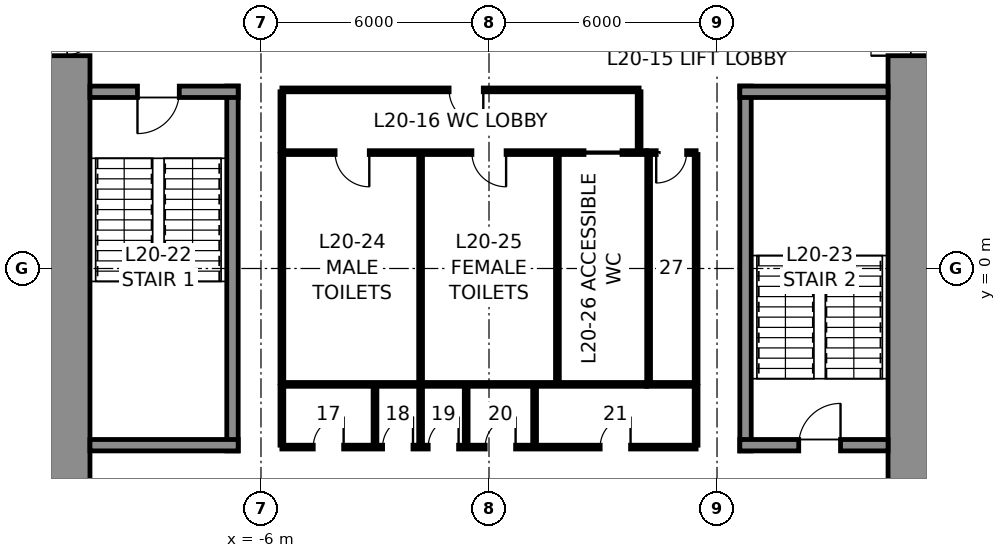
"""IFC4 building model, lengths in metres.
Left out: names, types, materials, properties, quantities, classifications, styles, units other than length and angle.
Written with IfcOpenShell. Run it as: python <this file> out.ifc"""

import sys

from ifc_helpers import new_model, si_unit, direction, frame, frame_2d, origin, place, context, subcontext, project, spatial, rectangle, extrude, element, fill, save


model = new_model("IFC4")
c1 = context("Model", 3, precision=1e-05, world=origin(), true_north=direction((0.0, 1.0)))
c2 = subcontext(c1, "Body", "Model", "MODEL_VIEW")
j1 = project(units=[si_unit("LENGTHUNIT", "METRE"), si_unit("PLANEANGLEUNIT", "RADIAN")], contexts=[c1])
p1 = place(None, origin())
s1 = spatial("IfcSite", under=j1, at=p1, CompositionType="ELEMENT")
p2 = place(p1, origin())
s2 = spatial("IfcBuilding", under=s1, at=p2, CompositionType="ELEMENT")
p3 = place(p2, frame((0.0, 0.0, 104.4)))
s3 = spatial("IfcBuildingStorey", under=s2, at=p3, CompositionType="ELEMENT", Elevation=104.4)
p4 = place(p3, frame((11.25, 10.5, 0.0), z_axis=(0.0, 0.0, 1.0), x_axis=(0.0, -1.0, 0.0)))
e1 = element("IfcWall", 1, at=p4, inside=s3, PredefinedType="SHEAR", context=c2, shape_type="SweptSolid", body=[
    extrude(rectangle(XDim=21.0, YDim=1.5, at=frame_2d((10.5, 0.0))), origin(), (0.0, 0.0, 1.0), 4.6),
])
p5 = place(p4, frame((3.7, 0.0, 0.0)))
e2 = element("IfcOpeningElement", 2, at=p5, cuts=e1, PredefinedType="OPENING", context=c2, shape_type="SweptSolid", body=[
    extrude(rectangle(XDim=1.2, YDim=2.3, at=frame_2d((0.6, 1.15))), frame((0.0, 0.76, 0.0), z_axis=(0.0, -1.0, 0.0), x_axis=(1.0, 0.0, 0.0)), (0.0, 0.0, 1.0), 1.52),
])
p6 = place(p4, frame((16.1, 0.0, 0.0)))
e3 = element("IfcOpeningElement", 3, at=p6, cuts=e1, PredefinedType="OPENING", context=c2, shape_type="SweptSolid", body=[
    extrude(rectangle(XDim=1.2, YDim=2.3, at=frame_2d((0.6, 1.15))), frame((0.0, 0.76, 0.0), z_axis=(0.0, -1.0, 0.0), x_axis=(1.0, 0.0, 0.0)), (0.0, 0.0, 1.0), 1.52),
])
p7 = place(p3, frame((-11.25, -10.5, 0.0), z_axis=(0.0, 0.0, 1.0), x_axis=(0.0, 1.0, 0.0)))
e4 = element("IfcWall", 4, at=p7, inside=s3, PredefinedType="SHEAR", context=c2, shape_type="SweptSolid", body=[
    extrude(rectangle(XDim=21.0, YDim=1.5, at=frame_2d((10.5, 0.0))), origin(), (0.0, 0.0, 1.0), 4.6),
])
p8 = place(p7, frame((16.1, 0.0, 0.0)))
e5 = element("IfcOpeningElement", 5, at=p8, cuts=e4, PredefinedType="OPENING", context=c2, shape_type="SweptSolid", body=[
    extrude(rectangle(XDim=1.2, YDim=2.3, at=frame_2d((0.6, 1.15))), frame((0.0, 0.76, 0.0), z_axis=(0.0, -1.0, 0.0), x_axis=(1.0, 0.0, 0.0)), (0.0, 0.0, 1.0), 1.52),
])
p9 = place(p7, frame((3.7, 0.0, 0.0)))
e6 = element("IfcOpeningElement", 6, at=p9, cuts=e4, PredefinedType="OPENING", context=c2, shape_type="SweptSolid", body=[
    extrude(rectangle(XDim=1.2, YDim=2.3, at=frame_2d((0.6, 1.15))), frame((0.0, 0.76, 0.0), z_axis=(0.0, -1.0, 0.0), x_axis=(1.0, 0.0, 0.0)), (0.0, 0.0, 1.0), 1.52),
])
p10 = place(p3, frame((-6.75, -4.8, 0.0), z_axis=(0.0, 0.0, 1.0), x_axis=(0.0, 1.0, 0.0)))
e7 = element("IfcWall", 7, at=p10, inside=s3, PredefinedType="SOLIDWALL", context=c2, shape_type="SweptSolid", body=[
    extrude(rectangle(XDim=9.6, YDim=0.3, at=frame_2d((4.8, 0.0))), origin(), (0.0, 0.0, 1.0), 4.35),
])
p11 = place(p3, frame((-10.5, 4.65, 0.0), z_axis=(0.0, 0.0, 1.0), x_axis=(1.0, 0.0, 0.0)))
e8 = element("IfcWall", 8, at=p11, inside=s3, PredefinedType="SOLIDWALL", context=c2, shape_type="SweptSolid", body=[
    extrude(rectangle(XDim=3.9, YDim=0.3, at=frame_2d((1.95, 0.0))), origin(), (0.0, 0.0, 1.0), 4.35),
])
p12 = place(p11, frame((1.25, 0.0, 0.0)))
e9 = element("IfcOpeningElement", 9, at=p12, cuts=e8, PredefinedType="OPENING", context=c2, shape_type="SweptSolid", body=[
    extrude(rectangle(XDim=1.1, YDim=2.3, at=frame_2d((0.55, 1.15))), frame((0.0, 0.16, 0.0), z_axis=(0.0, -1.0, 0.0), x_axis=(1.0, 0.0, 0.0)), (0.0, 0.0, 1.0), 0.32),
])
p13 = place(p3, frame((-6.6, -4.65, 0.0), z_axis=(0.0, 0.0, 1.0), x_axis=(-1.0, 0.0, 0.0)))
e10 = element("IfcWall", 10, at=p13, inside=s3, PredefinedType="SOLIDWALL", context=c2, shape_type="SweptSolid", body=[
    extrude(rectangle(XDim=3.9, YDim=0.3, at=frame_2d((1.95, 0.0))), origin(), (0.0, 0.0, 1.0), 4.35),
])
p14 = place(p3, frame((6.75, -4.8, 0.0), z_axis=(0.0, 0.0, 1.0), x_axis=(0.0, 1.0, 0.0)))
e11 = element("IfcWall", 11, at=p14, inside=s3, PredefinedType="SOLIDWALL", context=c2, shape_type="SweptSolid", body=[
    extrude(rectangle(XDim=9.6, YDim=0.3, at=frame_2d((4.8, 0.0))), origin(), (0.0, 0.0, 1.0), 4.35),
])
p15 = place(p3, frame((6.6, 4.65, 0.0), z_axis=(0.0, 0.0, 1.0), x_axis=(1.0, 0.0, 0.0)))
e12 = element("IfcWall", 12, at=p15, inside=s3, PredefinedType="SOLIDWALL", context=c2, shape_type="SweptSolid", body=[
    extrude(rectangle(XDim=3.9, YDim=0.3, at=frame_2d((1.95, 0.0))), origin(), (0.0, 0.0, 1.0), 4.35),
])
p16 = place(p3, frame((10.5, -4.65, 0.0), z_axis=(0.0, 0.0, 1.0), x_axis=(-1.0, 0.0, 0.0)))
e13 = element("IfcWall", 13, at=p16, inside=s3, PredefinedType="SOLIDWALL", context=c2, shape_type="SweptSolid", body=[
    extrude(rectangle(XDim=3.9, YDim=0.3, at=frame_2d((1.95, 0.0))), origin(), (0.0, 0.0, 1.0), 4.35),
])
p17 = place(p16, frame((1.25, 0.0, 0.0)))
e14 = element("IfcOpeningElement", 14, at=p17, cuts=e13, PredefinedType="OPENING", context=c2, shape_type="SweptSolid", body=[
    extrude(rectangle(XDim=1.1, YDim=2.3, at=frame_2d((0.55, 1.15))), frame((0.0, 0.16, 0.0), z_axis=(0.0, -1.0, 0.0), x_axis=(1.0, 0.0, 0.0)), (0.0, 0.0, 1.0), 0.32),
])
p18 = place(p3, frame((-5.45, 3.05, 0.0), z_axis=(0.0, 0.0, 1.0), x_axis=(1.0, 0.0, 0.0)))
e15 = element("IfcWall", 15, at=p18, inside=s3, PredefinedType="PARTITIONING", context=c2, shape_type="SweptSolid", body=[
    extrude(rectangle(XDim=9.6, YDim=0.1, at=frame_2d((4.8, 0.0))), origin(), (0.0, 0.0, 1.0), 4.35),
])
p19 = place(p18, frame((1.4, 0.0, 0.0)))
e16 = element("IfcOpeningElement", 16, at=p19, cuts=e15, PredefinedType="OPENING", context=c2, shape_type="SweptSolid", body=[
    extrude(rectangle(XDim=0.9, YDim=2.3, at=frame_2d((0.45, 1.15))), frame((0.0, 0.06, 0.0), z_axis=(0.0, -1.0, 0.0), x_axis=(1.0, 0.0, 0.0)), (0.0, 0.0, 1.0), 0.12),
])
p20 = place(p18, frame((5.0, 0.0, 0.0)))
e17 = element("IfcOpeningElement", 17, at=p20, cuts=e15, PredefinedType="OPENING", context=c2, shape_type="SweptSolid", body=[
    extrude(rectangle(XDim=0.9, YDim=2.3, at=frame_2d((0.45, 1.15))), frame((0.0, 0.06, 0.0), z_axis=(0.0, -1.0, 0.0), x_axis=(1.0, 0.0, 0.0)), (0.0, 0.0, 1.0), 0.12),
])
p21 = place(p18, frame((7.95, 0.0, 0.0)))
e18 = element("IfcOpeningElement", 18, at=p21, cuts=e15, PredefinedType="OPENING", context=c2, shape_type="SweptSolid", body=[
    extrude(rectangle(XDim=1.0, YDim=2.3, at=frame_2d((0.5, 1.15))), frame((0.0, 0.06, 0.0), z_axis=(0.0, -1.0, 0.0), x_axis=(1.0, 0.0, 0.0)), (0.0, 0.0, 1.0), 0.12),
])
p22 = place(p3, frame((4.15, 3.05, 0.0), z_axis=(0.0, 0.0, 1.0), x_axis=(1.0, 0.0, 0.0)))
e19 = element("IfcWall", 19, at=p22, inside=s3, PredefinedType="PARTITIONING", context=c2, shape_type="SweptSolid", body=[
    extrude(rectangle(XDim=1.3, YDim=0.1, at=frame_2d((0.65, 0.0))), origin(), (0.0, 0.0, 1.0), 4.35),
])
p23 = place(p22, frame((0.25, 0.0, 0.0)))
e20 = element("IfcOpeningElement", 20, at=p23, cuts=e19, PredefinedType="OPENING", context=c2, shape_type="SweptSolid", body=[
    extrude(rectangle(XDim=0.8, YDim=2.3, at=frame_2d((0.4, 1.15))), frame((0.0, 0.06, 0.0), z_axis=(0.0, -1.0, 0.0), x_axis=(1.0, 0.0, 0.0)), (0.0, 0.0, 1.0), 0.12),
])
p24 = place(p3, frame((4.15, -3.05, 0.0), z_axis=(0.0, 0.0, 1.0), x_axis=(-1.0, 0.0, 0.0)))
e21 = element("IfcWall", 21, at=p24, inside=s3, PredefinedType="PARTITIONING", context=c2, shape_type="SweptSolid", body=[
    extrude(rectangle(XDim=9.6, YDim=0.1, at=frame_2d((4.8, 0.0))), origin(), (0.0, 0.0, 1.0), 4.35),
])
p25 = place(p3, frame((5.45, -3.05, 0.0), z_axis=(0.0, 0.0, 1.0), x_axis=(-1.0, 0.0, 0.0)))
e22 = element("IfcWall", 22, at=p25, inside=s3, PredefinedType="PARTITIONING", context=c2, shape_type="SweptSolid", body=[
    extrude(rectangle(XDim=1.3, YDim=0.1, at=frame_2d((0.65, 0.0))), origin(), (0.0, 0.0, 1.0), 4.35),
])
for number, where, z_axis, x_axis in (
    (23, (5.45, 3.0, 0.0), (0.0, 0.0, 1.0), (0.0, -1.0, 0.0)),
    (24, (-5.45, -3.0, 0.0), (0.0, 0.0, 1.0), (0.0, 1.0, 0.0)),
    (25, (-1.8, -3.0, 0.0), (0.0, 0.0, 1.0), (0.0, 1.0, 0.0)),
    (26, (1.8, -3.0, 0.0), (0.0, 0.0, 1.0), (0.0, 1.0, 0.0)),
    (27, (4.2, -3.0, 0.0), (0.0, 0.0, 1.0), (0.0, 1.0, 0.0)),
):
    element("IfcWall", number, at=place(p3, frame(where, z_axis=z_axis, x_axis=x_axis)), inside=s3, PredefinedType="PARTITIONING", context=c2, shape_type="SweptSolid", body=[
        extrude(rectangle(XDim=6.0, YDim=0.1, at=frame_2d((3.0, 0.0))), origin(), (0.0, 0.0, 1.0), 4.35),
    ])
p26 = place(p3, frame((-5.45, 4.7, 0.0), z_axis=(0.0, 0.0, 1.0), x_axis=(1.0, 0.0, 0.0)))
e28 = element("IfcWall", 28, at=p26, inside=s3, PredefinedType="PARTITIONING", context=c2, shape_type="SweptSolid", body=[
    extrude(rectangle(XDim=9.4, YDim=0.1, at=frame_2d((4.7, 0.0))), origin(), (0.0, 0.0, 1.0), 4.35),
])
p27 = place(p26, frame((4.4, 0.0, 0.0)))
e29 = element("IfcOpeningElement", 29, at=p27, cuts=e28, PredefinedType="OPENING", context=c2, shape_type="SweptSolid", body=[
    extrude(rectangle(XDim=0.9, YDim=2.3, at=frame_2d((0.45, 1.15))), frame((0.0, 0.06, 0.0), z_axis=(0.0, -1.0, 0.0), x_axis=(1.0, 0.0, 0.0)), (0.0, 0.0, 1.0), 0.12),
])
for number, where, z_axis, x_axis in (
    (30, (-5.45, 3.1, 0.0), (0.0, 0.0, 1.0), (0.0, 1.0, 0.0)),
    (31, (3.95, 3.1, 0.0), (0.0, 0.0, 1.0), (0.0, 1.0, 0.0)),
):
    element("IfcWall", number, at=place(p3, frame(where, z_axis=z_axis, x_axis=x_axis)), inside=s3, PredefinedType="PARTITIONING", context=c2, shape_type="SweptSolid", body=[
        extrude(rectangle(XDim=1.55, YDim=0.1, at=frame_2d((0.775, 0.0))), origin(), (0.0, 0.0, 1.0), 4.35),
    ])
p28 = place(p3, frame((5.45, -4.7, 0.0), z_axis=(0.0, 0.0, 1.0), x_axis=(-1.0, 0.0, 0.0)))
e32 = element("IfcWall", 32, at=p28, inside=s3, PredefinedType="PARTITIONING", context=c2, shape_type="SweptSolid", body=[
    extrude(rectangle(XDim=10.9, YDim=0.1, at=frame_2d((5.45, 0.0))), origin(), (0.0, 0.0, 1.0), 4.35),
])
p29 = place(p28, frame((9.275, 0.0, 0.0)))
e33 = element("IfcOpeningElement", 33, at=p29, cuts=e32, PredefinedType="OPENING", context=c2, shape_type="SweptSolid", body=[
    extrude(rectangle(XDim=0.8, YDim=2.3, at=frame_2d((0.4, 1.15))), frame((0.0, 0.06, 0.0), z_axis=(0.0, -1.0, 0.0), x_axis=(1.0, 0.0, 0.0)), (0.0, 0.0, 1.0), 0.12),
])
p30 = place(p28, frame((7.45, 0.0, 0.0)))
e34 = element("IfcOpeningElement", 34, at=p30, cuts=e32, PredefinedType="OPENING", context=c2, shape_type="SweptSolid", body=[
    extrude(rectangle(XDim=0.8, YDim=2.3, at=frame_2d((0.4, 1.15))), frame((0.0, 0.06, 0.0), z_axis=(0.0, -1.0, 0.0), x_axis=(1.0, 0.0, 0.0)), (0.0, 0.0, 1.0), 0.12),
])
p31 = place(p28, frame((6.25, 0.0, 0.0)))
e35 = element("IfcOpeningElement", 35, at=p31, cuts=e32, PredefinedType="OPENING", context=c2, shape_type="SweptSolid", body=[
    extrude(rectangle(XDim=0.8, YDim=2.3, at=frame_2d((0.4, 1.15))), frame((0.0, 0.06, 0.0), z_axis=(0.0, -1.0, 0.0), x_axis=(1.0, 0.0, 0.0)), (0.0, 0.0, 1.0), 0.12),
])
p32 = place(p28, frame((4.75, 0.0, 0.0)))
e36 = element("IfcOpeningElement", 36, at=p32, cuts=e32, PredefinedType="OPENING", context=c2, shape_type="SweptSolid", body=[
    extrude(rectangle(XDim=0.8, YDim=2.3, at=frame_2d((0.4, 1.15))), frame((0.0, 0.06, 0.0), z_axis=(0.0, -1.0, 0.0), x_axis=(1.0, 0.0, 0.0)), (0.0, 0.0, 1.0), 0.12),
])
p33 = place(p28, frame((1.725, 0.0, 0.0)))
e37 = element("IfcOpeningElement", 37, at=p33, cuts=e32, PredefinedType="OPENING", context=c2, shape_type="SweptSolid", body=[
    extrude(rectangle(XDim=0.8, YDim=2.3, at=frame_2d((0.4, 1.15))), frame((0.0, 0.06, 0.0), z_axis=(0.0, -1.0, 0.0), x_axis=(1.0, 0.0, 0.0)), (0.0, 0.0, 1.0), 0.12),
])
for number, where, z_axis, x_axis in (
    (38, (-5.45, -3.1, 0.0), (0.0, 0.0, 1.0), (0.0, -1.0, 0.0)),
    (39, (5.45, -3.1, 0.0), (0.0, 0.0, 1.0), (0.0, -1.0, 0.0)),
    (40, (-3.0, -3.1, 0.0), (0.0, 0.0, 1.0), (0.0, -1.0, 0.0)),
    (41, (-1.8, -3.1, 0.0), (0.0, 0.0, 1.0), (0.0, -1.0, 0.0)),
    (42, (-0.6, -3.1, 0.0), (0.0, 0.0, 1.0), (0.0, -1.0, 0.0)),
    (43, (1.2, -3.1, 0.0), (0.0, 0.0, 1.0), (0.0, -1.0, 0.0)),
):
    element("IfcWall", number, at=place(p3, frame(where, z_axis=z_axis, x_axis=x_axis)), inside=s3, PredefinedType="PARTITIONING", context=c2, shape_type="SweptSolid", body=[
        extrude(rectangle(XDim=1.55, YDim=0.1, at=frame_2d((0.775, 0.0))), origin(), (0.0, 0.0, 1.0), 4.35),
    ])
p34 = place(p12, frame((1.1, 0.0, 0.0), z_axis=(0.0, 0.0, 1.0), x_axis=(-1.0, 0.0, 0.0)))
e44 = element("IfcDoor", 44, at=p34, inside=s3, OperationType="SINGLE_SWING_RIGHT", PredefinedType="DOOR", context=c2, shape_type="SweptSolid", body=[
    extrude(rectangle(XDim=1.1, YDim=2.3, at=frame_2d((0.55, 1.15))), frame((0.0, 0.025, 0.0), z_axis=(0.0, -1.0, 0.0), x_axis=(1.0, 0.0, 0.0)), (0.0, 0.0, 1.0), 0.05),
])
fill(e9, e44)
p35 = place(p17, frame((1.1, 0.0, 0.0), z_axis=(0.0, 0.0, 1.0), x_axis=(-1.0, 0.0, 0.0)))
e45 = element("IfcDoor", 45, at=p35, inside=s3, OperationType="SINGLE_SWING_RIGHT", PredefinedType="DOOR", context=c2, shape_type="SweptSolid", body=[
    extrude(rectangle(XDim=1.1, YDim=2.3, at=frame_2d((0.55, 1.15))), frame((0.0, 0.025, 0.0), z_axis=(0.0, -1.0, 0.0), x_axis=(1.0, 0.0, 0.0)), (0.0, 0.0, 1.0), 0.05),
])
fill(e14, e45)
p36 = place(p19, frame((0.9, 0.0, 0.0), z_axis=(0.0, 0.0, 1.0), x_axis=(-1.0, 0.0, 0.0)))
e46 = element("IfcDoor", 46, at=p36, inside=s3, OperationType="SINGLE_SWING_LEFT", PredefinedType="DOOR", context=c2, shape_type="SweptSolid", body=[
    extrude(rectangle(XDim=0.9, YDim=2.3, at=frame_2d((0.45, 1.15))), frame((0.0, 0.025, 0.0), z_axis=(0.0, -1.0, 0.0), x_axis=(1.0, 0.0, 0.0)), (0.0, 0.0, 1.0), 0.05),
])
fill(e16, e46)
p37 = place(p20, frame((0.9, 0.0, 0.0), z_axis=(0.0, 0.0, 1.0), x_axis=(-1.0, 0.0, 0.0)))
e47 = element("IfcDoor", 47, at=p37, inside=s3, OperationType="SINGLE_SWING_LEFT", PredefinedType="DOOR", context=c2, shape_type="SweptSolid", body=[
    extrude(rectangle(XDim=0.9, YDim=2.3, at=frame_2d((0.45, 1.15))), frame((0.0, 0.025, 0.0), z_axis=(0.0, -1.0, 0.0), x_axis=(1.0, 0.0, 0.0)), (0.0, 0.0, 1.0), 0.05),
])
fill(e17, e47)
p38 = place(p21, frame((1.0, 0.0, 0.0), z_axis=(0.0, 0.0, 1.0), x_axis=(-1.0, 0.0, 0.0)))
e48 = element("IfcDoor", 48, at=p38, inside=s3, OperationType="SLIDING_TO_LEFT", PredefinedType="DOOR", context=c2, shape_type="SweptSolid", body=[
    extrude(rectangle(XDim=1.0, YDim=2.3, at=frame_2d((0.5, 1.15))), frame((0.0, 0.025, 0.0), z_axis=(0.0, -1.0, 0.0), x_axis=(1.0, 0.0, 0.0)), (0.0, 0.0, 1.0), 0.05),
])
fill(e18, e48)
p39 = place(p23, frame((0.8, 0.0, 0.0), z_axis=(0.0, 0.0, 1.0), x_axis=(-1.0, 0.0, 0.0)))
e49 = element("IfcDoor", 49, at=p39, inside=s3, OperationType="SINGLE_SWING_RIGHT", PredefinedType="DOOR", context=c2, shape_type="SweptSolid", body=[
    extrude(rectangle(XDim=0.8, YDim=2.3, at=frame_2d((0.4, 1.15))), frame((0.0, 0.025, 0.0), z_axis=(0.0, -1.0, 0.0), x_axis=(1.0, 0.0, 0.0)), (0.0, 0.0, 1.0), 0.05),
])
fill(e20, e49)
p40 = place(p27, frame((0.9, 0.0, 0.0), z_axis=(0.0, 0.0, 1.0), x_axis=(-1.0, 0.0, 0.0)))
e50 = element("IfcDoor", 50, at=p40, inside=s3, OperationType="SINGLE_SWING_LEFT", PredefinedType="DOOR", context=c2, shape_type="SweptSolid", body=[
    extrude(rectangle(XDim=0.9, YDim=2.3, at=frame_2d((0.45, 1.15))), frame((0.0, 0.025, 0.0), z_axis=(0.0, -1.0, 0.0), x_axis=(1.0, 0.0, 0.0)), (0.0, 0.0, 1.0), 0.05),
])
fill(e29, e50)
p41 = place(p29, frame((0.8, 0.0, 0.0), z_axis=(0.0, 0.0, 1.0), x_axis=(-1.0, 0.0, 0.0)))
e51 = element("IfcDoor", 51, at=p41, inside=s3, OperationType="SINGLE_SWING_RIGHT", PredefinedType="DOOR", context=c2, shape_type="SweptSolid", body=[
    extrude(rectangle(XDim=0.8, YDim=2.3, at=frame_2d((0.4, 1.15))), frame((0.0, 0.025, 0.0), z_axis=(0.0, -1.0, 0.0), x_axis=(1.0, 0.0, 0.0)), (0.0, 0.0, 1.0), 0.05),
])
fill(e33, e51)
p42 = place(p30, frame((0.8, 0.0, 0.0), z_axis=(0.0, 0.0, 1.0), x_axis=(-1.0, 0.0, 0.0)))
e52 = element("IfcDoor", 52, at=p42, inside=s3, OperationType="SINGLE_SWING_RIGHT", PredefinedType="DOOR", context=c2, shape_type="SweptSolid", body=[
    extrude(rectangle(XDim=0.8, YDim=2.3, at=frame_2d((0.4, 1.15))), frame((0.0, 0.025, 0.0), z_axis=(0.0, -1.0, 0.0), x_axis=(1.0, 0.0, 0.0)), (0.0, 0.0, 1.0), 0.05),
])
fill(e34, e52)
p43 = place(p31, frame((0.8, 0.0, 0.0), z_axis=(0.0, 0.0, 1.0), x_axis=(-1.0, 0.0, 0.0)))
e53 = element("IfcDoor", 53, at=p43, inside=s3, OperationType="SINGLE_SWING_RIGHT", PredefinedType="DOOR", context=c2, shape_type="SweptSolid", body=[
    extrude(rectangle(XDim=0.8, YDim=2.3, at=frame_2d((0.4, 1.15))), frame((0.0, 0.025, 0.0), z_axis=(0.0, -1.0, 0.0), x_axis=(1.0, 0.0, 0.0)), (0.0, 0.0, 1.0), 0.05),
])
fill(e35, e53)
p44 = place(p32, frame((0.8, 0.0, 0.0), z_axis=(0.0, 0.0, 1.0), x_axis=(-1.0, 0.0, 0.0)))
e54 = element("IfcDoor", 54, at=p44, inside=s3, OperationType="SINGLE_SWING_RIGHT", PredefinedType="DOOR", context=c2, shape_type="SweptSolid", body=[
    extrude(rectangle(XDim=0.8, YDim=2.3, at=frame_2d((0.4, 1.15))), frame((0.0, 0.025, 0.0), z_axis=(0.0, -1.0, 0.0), x_axis=(1.0, 0.0, 0.0)), (0.0, 0.0, 1.0), 0.05),
])
fill(e36, e54)
p45 = place(p33, frame((0.8, 0.0, 0.0), z_axis=(0.0, 0.0, 1.0), x_axis=(-1.0, 0.0, 0.0)))
e55 = element("IfcDoor", 55, at=p45, inside=s3, OperationType="SINGLE_SWING_RIGHT", PredefinedType="DOOR", context=c2, shape_type="SweptSolid", body=[
    extrude(rectangle(XDim=0.8, YDim=2.3, at=frame_2d((0.4, 1.15))), frame((0.0, 0.025, 0.0), z_axis=(0.0, -1.0, 0.0), x_axis=(1.0, 0.0, 0.0)), (0.0, 0.0, 1.0), 0.05),
])
fill(e37, e55)
p46 = place(p8, frame((1.2, 0.0, 0.0), z_axis=(0.0, 0.0, 1.0), x_axis=(-1.0, 0.0, 0.0)))
e56 = element("IfcDoor", 56, at=p46, inside=s3, OperationType="SINGLE_SWING_LEFT", PredefinedType="DOOR", context=c2, shape_type="SweptSolid", body=[
    extrude(rectangle(XDim=1.2, YDim=2.3, at=frame_2d((0.6, 1.15))), frame((0.0, 0.025, 0.0), z_axis=(0.0, -1.0, 0.0), x_axis=(1.0, 0.0, 0.0)), (0.0, 0.0, 1.0), 0.05),
])
fill(e5, e56)
p47 = place(p5, frame((1.2, 0.0, 0.0), z_axis=(0.0, 0.0, 1.0), x_axis=(-1.0, 0.0, 0.0)))
e57 = element("IfcDoor", 57, at=p47, inside=s3, OperationType="SINGLE_SWING_LEFT", PredefinedType="DOOR", context=c2, shape_type="SweptSolid", body=[
    extrude(rectangle(XDim=1.2, YDim=2.3, at=frame_2d((0.6, 1.15))), frame((0.0, 0.025, 0.0), z_axis=(0.0, -1.0, 0.0), x_axis=(1.0, 0.0, 0.0)), (0.0, 0.0, 1.0), 0.05),
])
fill(e2, e57)
save(model, sys.argv[1])
